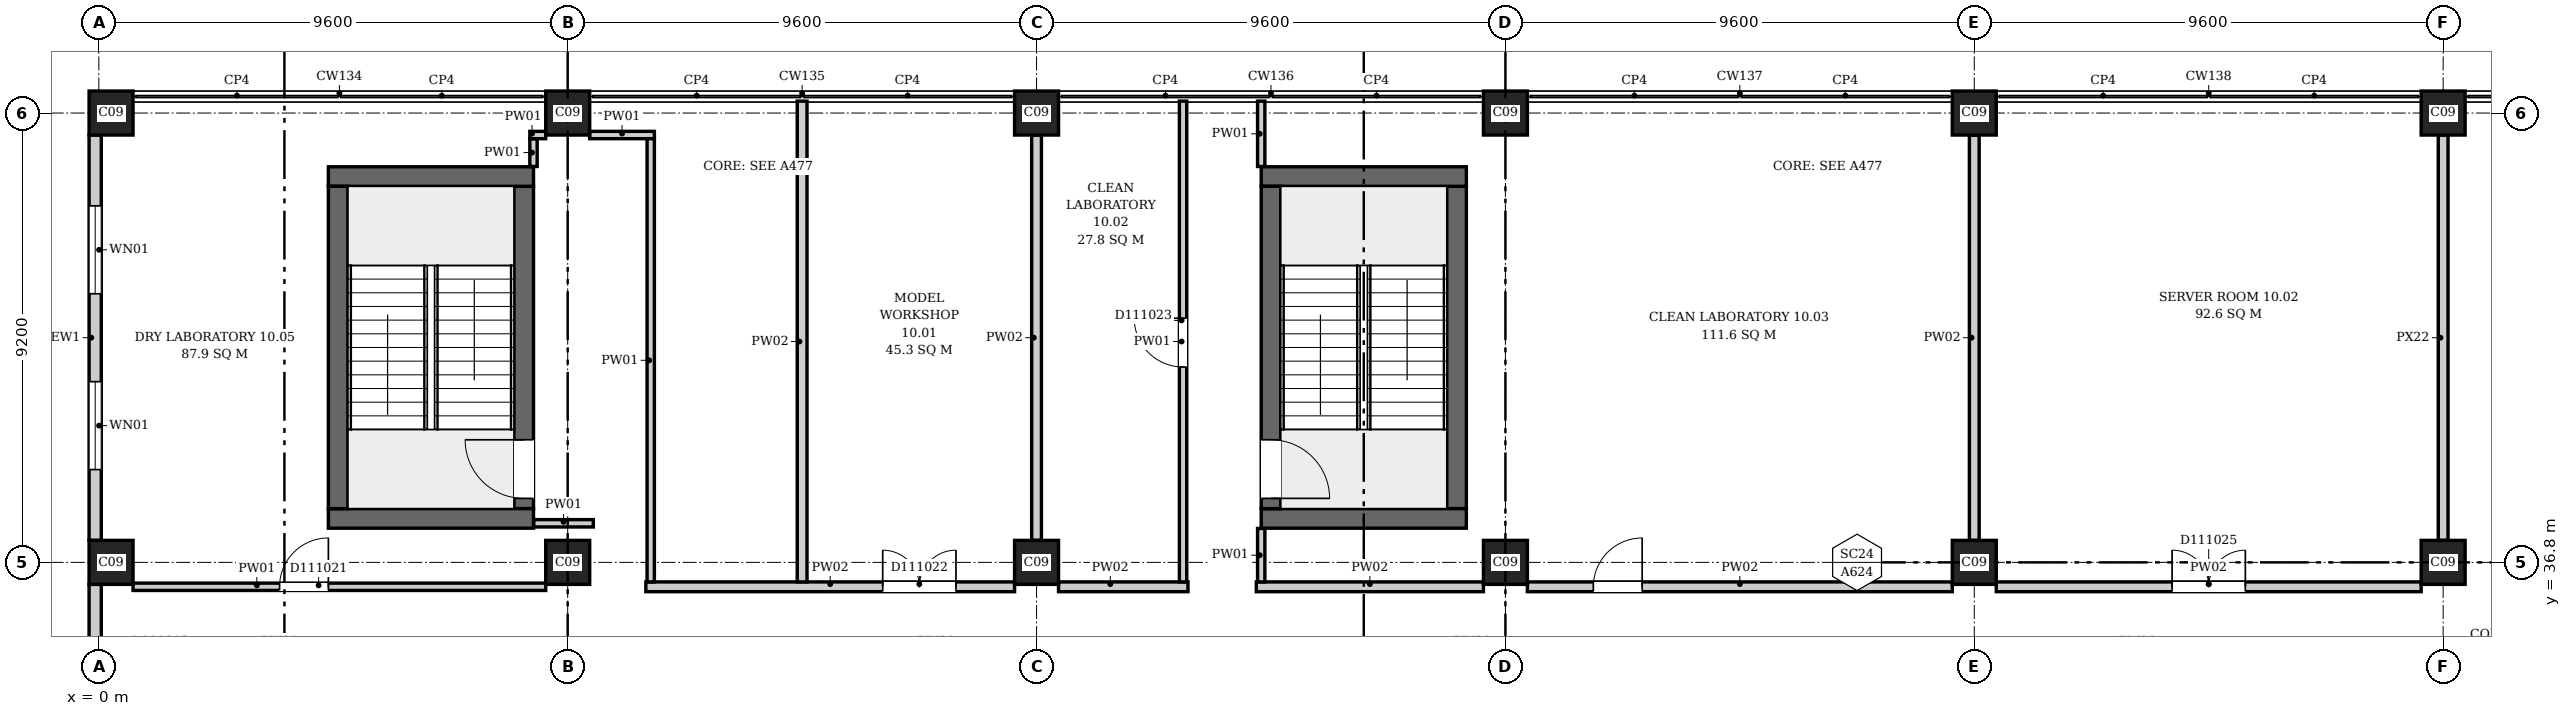
"""IFC4 building model, lengths in metres.
Left out: names, types, materials, properties, quantities, classifications, styles, units other than length and angle.
Written with IfcOpenShell. Run it as: python <this file> out.ifc"""

import sys

from ifc_helpers import new_model, si_unit, direction, frame, frame_2d, origin, origin_2d, place, context, subcontext, project, spatial, rectangle, extrude, element, fill, save


model = new_model("IFC4")
c1 = context("Model", 3, precision=1e-05, world=origin(), true_north=direction((0.0, 1.0)))
c2 = subcontext(c1, "Body", "Model", "MODEL_VIEW")
j1 = project(units=[si_unit("LENGTHUNIT", "METRE"), si_unit("PLANEANGLEUNIT", "RADIAN")], contexts=[c1])
p1 = place(None, origin())
s1 = spatial("IfcSite", under=j1, at=p1, CompositionType="ELEMENT")
p2 = place(p1, origin())
s2 = spatial("IfcBuilding", under=s1, at=p2, CompositionType="ELEMENT")
p3 = place(p2, frame((0.0, 0.0, 52.9)))
s3 = spatial("IfcBuildingStorey", under=s2, at=p3, CompositionType="ELEMENT", Elevation=52.9)
for number, where, z_axis, x_axis in (
    (1, (4.7, 37.7, 0.0), (0.0, 0.0, 1.0), (1.0, 0.0, 0.0)),
    (2, (4.7, 44.7, 0.0), (0.0, 0.0, 1.0), (1.0, 0.0, 0.0)),
):
    element("IfcWall", number, at=place(p3, frame(where, z_axis=z_axis, x_axis=x_axis)), inside=s3, PredefinedType="SHEAR", context=c2, shape_type="SweptSolid", body=[
        extrude(rectangle(XDim=4.2, YDim=0.4, at=frame_2d((2.1, 0.0))), origin(), (0.0, 0.0, 1.0), 4.2),
    ])
p4 = place(p3, frame((4.9, 37.9, 0.0), z_axis=(0.0, 0.0, 1.0), x_axis=(0.0, 1.0, 0.0)))
e3 = element("IfcWall", 3, at=p4, inside=s3, PredefinedType="SHEAR", context=c2, shape_type="SweptSolid", body=[
    extrude(rectangle(XDim=6.6, YDim=0.4, at=frame_2d((3.3, 0.0))), origin(), (0.0, 0.0, 1.0), 4.2),
])
p5 = place(p3, frame((8.7, 37.9, 0.0), z_axis=(0.0, 0.0, 1.0), x_axis=(0.0, 1.0, 0.0)))
e4 = element("IfcWall", 4, at=p5, inside=s3, PredefinedType="SHEAR", context=c2, shape_type="SweptSolid", body=[
    extrude(rectangle(XDim=6.6, YDim=0.4, at=frame_2d((3.3, 0.0))), origin(), (0.0, 0.0, 1.0), 4.2),
])
p6 = place(p5, frame((0.21, 0.0, 0.0)))
e5 = element("IfcOpeningElement", 5, at=p6, cuts=e4, PredefinedType="OPENING", context=c2, shape_type="SweptSolid", body=[
    extrude(rectangle(XDim=1.2, YDim=2.1, at=frame_2d((0.6, 1.05))), frame((0.0, 0.21, 0.0), z_axis=(0.0, -1.0, 0.0), x_axis=(1.0, 0.0, 0.0)), (0.0, 0.0, 1.0), 0.42),
])
for number, where, z_axis, x_axis in (
    (6, (23.8, 37.7, 0.0), (0.0, 0.0, 1.0), (1.0, 0.0, 0.0)),
    (7, (23.8, 44.7, 0.0), (0.0, 0.0, 1.0), (1.0, 0.0, 0.0)),
):
    element("IfcWall", number, at=place(p3, frame(where, z_axis=z_axis, x_axis=x_axis)), inside=s3, PredefinedType="SHEAR", context=c2, shape_type="SweptSolid", body=[
        extrude(rectangle(XDim=4.2, YDim=0.4, at=frame_2d((2.1, 0.0))), origin(), (0.0, 0.0, 1.0), 4.2),
    ])
p7 = place(p3, frame((24.0, 37.9, 0.0), z_axis=(0.0, 0.0, 1.0), x_axis=(0.0, 1.0, 0.0)))
e8 = element("IfcWall", 8, at=p7, inside=s3, PredefinedType="SHEAR", context=c2, shape_type="SweptSolid", body=[
    extrude(rectangle(XDim=6.6, YDim=0.4, at=frame_2d((3.3, 0.0))), origin(), (0.0, 0.0, 1.0), 4.2),
])
p8 = place(p7, frame((0.21, 0.0, 0.0)))
e9 = element("IfcOpeningElement", 9, at=p8, cuts=e8, PredefinedType="OPENING", context=c2, shape_type="SweptSolid", body=[
    extrude(rectangle(XDim=1.2, YDim=2.1, at=frame_2d((0.6, 1.05))), frame((0.0, 0.21, 0.0), z_axis=(0.0, -1.0, 0.0), x_axis=(1.0, 0.0, 0.0)), (0.0, 0.0, 1.0), 0.42),
])
p9 = place(p3, frame((27.8, 37.9, 0.0), z_axis=(0.0, 0.0, 1.0), x_axis=(0.0, 1.0, 0.0)))
e10 = element("IfcWall", 10, at=p9, inside=s3, PredefinedType="SHEAR", context=c2, shape_type="SweptSolid", body=[
    extrude(rectangle(XDim=6.6, YDim=0.4, at=frame_2d((3.3, 0.0))), origin(), (0.0, 0.0, 1.0), 4.2),
])
for number, where, z_axis, x_axis in (
    (11, (0.25, 36.8, 0.0), (0.0, 0.0, 1.0), (1.0, 0.0, 0.0)),
    (12, (9.6, 36.8, 0.0), (0.0, 0.0, 1.0), (1.0, 0.0, 0.0)),
    (13, (19.2, 36.8, 0.0), (0.0, 0.0, 1.0), (1.0, 0.0, 0.0)),
    (14, (28.8, 36.8, 0.0), (0.0, 0.0, 1.0), (1.0, 0.0, 0.0)),
    (15, (38.4, 36.8, 0.0), (0.0, 0.0, 1.0), (1.0, 0.0, 0.0)),
    (16, (48.0, 36.8, 0.0), (0.0, 0.0, 1.0), (1.0, 0.0, 0.0)),
    (17, (0.25, 46.0, 0.0), (0.0, 0.0, 1.0), (1.0, 0.0, 0.0)),
    (18, (9.6, 46.0, 0.0), (0.0, 0.0, 1.0), (1.0, 0.0, 0.0)),
    (19, (19.2, 46.0, 0.0), (0.0, 0.0, 1.0), (1.0, 0.0, 0.0)),
    (20, (28.8, 46.0, 0.0), (0.0, 0.0, 1.0), (1.0, 0.0, 0.0)),
    (21, (38.4, 46.0, 0.0), (0.0, 0.0, 1.0), (1.0, 0.0, 0.0)),
    (22, (48.0, 46.0, 0.0), (0.0, 0.0, 1.0), (1.0, 0.0, 0.0)),
):
    element("IfcColumn", number, at=place(p3, frame(where, z_axis=z_axis, x_axis=x_axis)), inside=s3, PredefinedType="COLUMN", context=c2, shape_type="SweptSolid", body=[
        extrude(rectangle(XDim=0.9, YDim=0.9, at=origin_2d()), origin(), (0.0, 0.0, 1.0), 4.2),
    ])
p10 = place(p3, frame((-0.074, 36.35, 0.0), z_axis=(0.0, 0.0, 1.0), x_axis=(0.0, -1.0, 0.0)))
e23 = element("IfcWall", 23, at=p10, inside=s3, PredefinedType="ELEMENTEDWALL", context=c2, shape_type="SweptSolid", body=[
    extrude(rectangle(XDim=8.3, YDim=0.25, at=frame_2d((4.15, 0.0))), origin(), (0.0, 0.0, 1.0), 3.9),
])
p11 = place(p10, frame((5.05, 0.0, 0.9)))
e24 = element("IfcOpeningElement", 24, at=p11, cuts=e23, PredefinedType="OPENING", context=c2, shape_type="SweptSolid", body=[
    extrude(rectangle(XDim=1.8, YDim=2.6, at=frame_2d((0.9, 1.3))), frame((0.0, 0.135, 0.0), z_axis=(0.0, -1.0, 0.0), x_axis=(1.0, 0.0, 0.0)), (0.0, 0.0, 1.0), 0.27),
])
p12 = place(p10, frame((1.7, 0.0, 0.9)))
e25 = element("IfcOpeningElement", 25, at=p12, cuts=e23, PredefinedType="OPENING", context=c2, shape_type="SweptSolid", body=[
    extrude(rectangle(XDim=1.8, YDim=2.6, at=frame_2d((0.9, 1.3))), frame((0.0, 0.135, 0.0), z_axis=(0.0, -1.0, 0.0), x_axis=(1.0, 0.0, 0.0)), (0.0, 0.0, 1.0), 0.27),
])
p13 = place(p3, frame((-0.074, 45.55, 0.0), z_axis=(0.0, 0.0, 1.0), x_axis=(0.0, -1.0, 0.0)))
e26 = element("IfcWall", 26, at=p13, inside=s3, PredefinedType="ELEMENTEDWALL", context=c2, shape_type="SweptSolid", body=[
    extrude(rectangle(XDim=8.3, YDim=0.25, at=frame_2d((4.15, 0.0))), origin(), (0.0, 0.0, 1.0), 3.9),
])
p14 = place(p13, frame((5.05, 0.0, 0.9)))
e27 = element("IfcOpeningElement", 27, at=p14, cuts=e26, PredefinedType="OPENING", context=c2, shape_type="SweptSolid", body=[
    extrude(rectangle(XDim=1.8, YDim=2.6, at=frame_2d((0.9, 1.3))), frame((0.0, 0.135, 0.0), z_axis=(0.0, -1.0, 0.0), x_axis=(1.0, 0.0, 0.0)), (0.0, 0.0, 1.0), 0.27),
])
p15 = place(p13, frame((1.45, 0.0, 0.9)))
e28 = element("IfcOpeningElement", 28, at=p15, cuts=e26, PredefinedType="OPENING", context=c2, shape_type="SweptSolid", body=[
    extrude(rectangle(XDim=1.8, YDim=2.6, at=frame_2d((0.9, 1.3))), frame((0.0, 0.135, 0.0), z_axis=(0.0, -1.0, 0.0), x_axis=(1.0, 0.0, 0.0)), (0.0, 0.0, 1.0), 0.27),
])
p16 = place(p3, frame((0.7, 36.3, 0.0), z_axis=(0.0, 0.0, 1.0), x_axis=(1.0, 0.0, 0.0)))
e29 = element("IfcWall", 29, at=p16, inside=s3, PredefinedType="PARTITIONING", context=c2, shape_type="SweptSolid", body=[
    extrude(rectangle(XDim=8.45, YDim=0.15, at=frame_2d((4.225, 0.0))), origin(), (0.0, 0.0, 1.0), 3.9),
])
p17 = place(p16, frame((3.0, 0.0, 0.0)))
e30 = element("IfcOpeningElement", 30, at=p17, cuts=e29, PredefinedType="OPENING", context=c2, shape_type="SweptSolid", body=[
    extrude(rectangle(XDim=1.0, YDim=2.1, at=frame_2d((0.5, 1.05))), frame((0.0, 0.085, 0.0), z_axis=(0.0, -1.0, 0.0), x_axis=(1.0, 0.0, 0.0)), (0.0, 0.0, 1.0), 0.17),
])
p18 = place(p3, frame((8.9, 44.906, 0.0), z_axis=(0.0, 0.0, 1.0), x_axis=(0.0, 1.0, 0.0)))
e31 = element("IfcWall", 31, at=p18, inside=s3, PredefinedType="PARTITIONING", context=c2, shape_type="SweptSolid", body=[
    extrude(rectangle(XDim=0.569, YDim=0.15, at=frame_2d((0.285, 0.0))), origin(), (0.0, 0.0, 1.0), 3.9),
])
p19 = place(p3, frame((8.825, 45.55, 0.0), z_axis=(0.0, 0.0, 1.0), x_axis=(1.0, 0.0, 0.0)))
e32 = element("IfcWall", 32, at=p19, inside=s3, PredefinedType="PARTITIONING", context=c2, shape_type="SweptSolid", body=[
    extrude(rectangle(XDim=0.325, YDim=0.15, at=frame_2d((0.163, 0.0))), origin(), (0.0, 0.0, 1.0), 3.9),
])
p20 = place(p3, frame((8.906, 37.6, 0.0), z_axis=(0.0, 0.0, 1.0), x_axis=(1.0, 0.0, 0.0)))
e33 = element("IfcWall", 33, at=p20, inside=s3, PredefinedType="PARTITIONING", context=c2, shape_type="SweptSolid", body=[
    extrude(rectangle(XDim=1.219, YDim=0.15, at=frame_2d((0.609, 0.0))), origin(), (0.0, 0.0, 1.0), 3.9),
])
p21 = place(p3, frame((10.05, 45.55, 0.0), z_axis=(0.0, 0.0, 1.0), x_axis=(1.0, 0.0, 0.0)))
e34 = element("IfcWall", 34, at=p21, inside=s3, PredefinedType="PARTITIONING", context=c2, shape_type="SweptSolid", body=[
    extrude(rectangle(XDim=1.325, YDim=0.15, at=frame_2d((0.663, 0.0))), origin(), (0.0, 0.0, 1.0), 3.9),
])
p22 = place(p3, frame((11.2, 36.3, 0.0), z_axis=(0.0, 0.0, 1.0), x_axis=(1.0, 0.0, 0.0)))
e35 = element("IfcWall", 35, at=p22, inside=s3, PredefinedType="PARTITIONING", context=c2, shape_type="SweptSolid", body=[
    extrude(rectangle(XDim=7.55, YDim=0.2, at=frame_2d((3.775, 0.0))), origin(), (0.0, 0.0, 1.0), 3.9),
])
p23 = place(p22, frame((4.85, 0.0, 0.0)))
e36 = element("IfcOpeningElement", 36, at=p23, cuts=e35, PredefinedType="OPENING", context=c2, shape_type="SweptSolid", body=[
    extrude(rectangle(XDim=1.5, YDim=2.1, at=frame_2d((0.75, 1.05))), frame((0.0, 0.11, 0.0), z_axis=(0.0, -1.0, 0.0), x_axis=(1.0, 0.0, 0.0)), (0.0, 0.0, 1.0), 0.22),
])
p24 = place(p3, frame((11.3, 36.4, 0.0), z_axis=(0.0, 0.0, 1.0), x_axis=(0.0, 1.0, 0.0)))
e37 = element("IfcWall", 37, at=p24, inside=s3, PredefinedType="PARTITIONING", context=c2, shape_type="SweptSolid", body=[
    extrude(rectangle(XDim=9.075, YDim=0.15, at=frame_2d((4.538, 0.0))), origin(), (0.0, 0.0, 1.0), 3.9),
])
p25 = place(p3, frame((14.4, 36.4, 0.0), z_axis=(0.0, 0.0, 1.0), x_axis=(0.0, 1.0, 0.0)))
e38 = element("IfcWall", 38, at=p25, inside=s3, PredefinedType="PARTITIONING", context=c2, shape_type="SweptSolid", body=[
    extrude(rectangle(XDim=9.844, YDim=0.2, at=frame_2d((4.922, 0.0))), origin(), (0.0, 0.0, 1.0), 3.9),
])
p26 = place(p3, frame((19.2, 37.25, 0.0), z_axis=(0.0, 0.0, 1.0), x_axis=(0.0, 1.0, 0.0)))
e39 = element("IfcWall", 39, at=p26, inside=s3, PredefinedType="PARTITIONING", context=c2, shape_type="SweptSolid", body=[
    extrude(rectangle(XDim=8.3, YDim=0.2, at=frame_2d((4.15, 0.0))), origin(), (0.0, 0.0, 1.0), 3.9),
])
p27 = place(p3, frame((19.65, 36.3, 0.0), z_axis=(0.0, 0.0, 1.0), x_axis=(1.0, 0.0, 0.0)))
e40 = element("IfcWall", 40, at=p27, inside=s3, PredefinedType="PARTITIONING", context=c2, shape_type="SweptSolid", body=[
    extrude(rectangle(XDim=2.65, YDim=0.2, at=frame_2d((1.325, 0.0))), origin(), (0.0, 0.0, 1.0), 3.9),
])
p28 = place(p3, frame((22.2, 36.4, 0.0), z_axis=(0.0, 0.0, 1.0), x_axis=(0.0, 1.0, 0.0)))
e41 = element("IfcWall", 41, at=p28, inside=s3, PredefinedType="PARTITIONING", context=c2, shape_type="SweptSolid", body=[
    extrude(rectangle(XDim=9.844, YDim=0.15, at=frame_2d((4.922, 0.0))), origin(), (0.0, 0.0, 1.0), 3.9),
])
p29 = place(p28, frame((4.4, 0.0, 0.0)))
e42 = element("IfcOpeningElement", 42, at=p29, cuts=e41, PredefinedType="OPENING", context=c2, shape_type="SweptSolid", body=[
    extrude(rectangle(XDim=1.0, YDim=2.1, at=frame_2d((0.5, 1.05))), frame((0.0, 0.085, 0.0), z_axis=(0.0, -1.0, 0.0), x_axis=(1.0, 0.0, 0.0)), (0.0, 0.0, 1.0), 0.17),
])
p30 = place(p3, frame((23.7, 36.3, 0.0), z_axis=(0.0, 0.0, 1.0), x_axis=(1.0, 0.0, 0.0)))
e43 = element("IfcWall", 43, at=p30, inside=s3, PredefinedType="PARTITIONING", context=c2, shape_type="SweptSolid", body=[
    extrude(rectangle(XDim=4.65, YDim=0.2, at=frame_2d((2.325, 0.0))), origin(), (0.0, 0.0, 1.0), 3.9),
])
p31 = place(p3, frame((23.8, 36.4, 0.0), z_axis=(0.0, 0.0, 1.0), x_axis=(0.0, 1.0, 0.0)))
e44 = element("IfcWall", 44, at=p31, inside=s3, PredefinedType="PARTITIONING", context=c2, shape_type="SweptSolid", body=[
    extrude(rectangle(XDim=1.094, YDim=0.15, at=frame_2d((0.547, 0.0))), origin(), (0.0, 0.0, 1.0), 3.9),
])
p32 = place(p3, frame((23.8, 44.906, 0.0), z_axis=(0.0, 0.0, 1.0), x_axis=(0.0, 1.0, 0.0)))
e45 = element("IfcWall", 45, at=p32, inside=s3, PredefinedType="PARTITIONING", context=c2, shape_type="SweptSolid", body=[
    extrude(rectangle(XDim=1.338, YDim=0.15, at=frame_2d((0.669, 0.0))), origin(), (0.0, 0.0, 1.0), 3.9),
])
p33 = place(p3, frame((29.25, 36.3, 0.0), z_axis=(0.0, 0.0, 1.0), x_axis=(1.0, 0.0, 0.0)))
e46 = element("IfcWall", 46, at=p33, inside=s3, PredefinedType="PARTITIONING", context=c2, shape_type="SweptSolid", body=[
    extrude(rectangle(XDim=8.7, YDim=0.2, at=frame_2d((4.35, 0.0))), origin(), (0.0, 0.0, 1.0), 3.9),
])
p34 = place(p33, frame((1.35, 0.0, 0.0)))
e47 = element("IfcOpeningElement", 47, at=p34, cuts=e46, PredefinedType="OPENING", context=c2, shape_type="SweptSolid", body=[
    extrude(rectangle(XDim=1.0, YDim=2.1, at=frame_2d((0.5, 1.05))), frame((0.0, 0.11, 0.0), z_axis=(0.0, -1.0, 0.0), x_axis=(1.0, 0.0, 0.0)), (0.0, 0.0, 1.0), 0.22),
])
p35 = place(p3, frame((38.4, 37.25, 0.0), z_axis=(0.0, 0.0, 1.0), x_axis=(0.0, 1.0, 0.0)))
e48 = element("IfcWall", 48, at=p35, inside=s3, PredefinedType="PARTITIONING", context=c2, shape_type="SweptSolid", body=[
    extrude(rectangle(XDim=8.3, YDim=0.2, at=frame_2d((4.15, 0.0))), origin(), (0.0, 0.0, 1.0), 3.9),
])
p36 = place(p3, frame((38.85, 36.3, 0.0), z_axis=(0.0, 0.0, 1.0), x_axis=(1.0, 0.0, 0.0)))
e49 = element("IfcWall", 49, at=p36, inside=s3, PredefinedType="PARTITIONING", context=c2, shape_type="SweptSolid", body=[
    extrude(rectangle(XDim=8.7, YDim=0.2, at=frame_2d((4.35, 0.0))), origin(), (0.0, 0.0, 1.0), 3.9),
])
p37 = place(p36, frame((3.6, 0.0, 0.0)))
e50 = element("IfcOpeningElement", 50, at=p37, cuts=e49, PredefinedType="OPENING", context=c2, shape_type="SweptSolid", body=[
    extrude(rectangle(XDim=1.5, YDim=2.1, at=frame_2d((0.75, 1.05))), frame((0.0, 0.11, 0.0), z_axis=(0.0, -1.0, 0.0), x_axis=(1.0, 0.0, 0.0)), (0.0, 0.0, 1.0), 0.22),
])
p38 = place(p3, frame((48.0, 37.25, 0.0), z_axis=(0.0, 0.0, 1.0), x_axis=(0.0, 1.0, 0.0)))
e51 = element("IfcWall", 51, at=p38, inside=s3, PredefinedType="PARTITIONING", context=c2, shape_type="SweptSolid", body=[
    extrude(rectangle(XDim=8.3, YDim=0.2, at=frame_2d((4.15, 0.0))), origin(), (0.0, 0.0, 1.0), 3.3),
])
p39 = place(p14, origin())
e52 = element("IfcWindow", 52, at=p39, inside=s3, PartitioningType="SINGLE_PANEL", PredefinedType="WINDOW", context=c2, shape_type="SweptSolid", body=[
    extrude(rectangle(XDim=1.8, YDim=2.6, at=frame_2d((0.9, 1.3))), frame((0.0, 0.03, 0.0), z_axis=(0.0, -1.0, 0.0), x_axis=(1.0, 0.0, 0.0)), (0.0, 0.0, 1.0), 0.06),
])
fill(e27, e52)
p40 = place(p15, origin())
e53 = element("IfcWindow", 53, at=p40, inside=s3, PartitioningType="SINGLE_PANEL", PredefinedType="WINDOW", context=c2, shape_type="SweptSolid", body=[
    extrude(rectangle(XDim=1.8, YDim=2.6, at=frame_2d((0.9, 1.3))), frame((0.0, 0.03, 0.0), z_axis=(0.0, -1.0, 0.0), x_axis=(1.0, 0.0, 0.0)), (0.0, 0.0, 1.0), 0.06),
])
fill(e28, e53)
p41 = place(p6, origin())
e54 = element("IfcDoor", 54, at=p41, inside=s3, OperationType="SINGLE_SWING_RIGHT", PredefinedType="DOOR", context=c2, shape_type="SweptSolid", body=[
    extrude(rectangle(XDim=1.2, YDim=2.1, at=frame_2d((0.6, 1.05))), frame((0.0, 0.025, 0.0), z_axis=(0.0, -1.0, 0.0), x_axis=(1.0, 0.0, 0.0)), (0.0, 0.0, 1.0), 0.05),
])
fill(e5, e54)
p42 = place(p8, origin())
e55 = element("IfcDoor", 55, at=p42, inside=s3, OperationType="SINGLE_SWING_LEFT", PredefinedType="DOOR", context=c2, shape_type="SweptSolid", body=[
    extrude(rectangle(XDim=1.2, YDim=2.1, at=frame_2d((0.6, 1.05))), frame((0.0, 0.025, 0.0), z_axis=(0.0, -1.0, 0.0), x_axis=(1.0, 0.0, 0.0)), (0.0, 0.0, 1.0), 0.05),
])
fill(e9, e55)
p43 = place(p17, origin())
e56 = element("IfcDoor", 56, at=p43, inside=s3, OperationType="SINGLE_SWING_RIGHT", PredefinedType="DOOR", context=c2, shape_type="SweptSolid", body=[
    extrude(rectangle(XDim=1.0, YDim=2.1, at=frame_2d((0.5, 1.05))), frame((0.0, 0.025, 0.0), z_axis=(0.0, -1.0, 0.0), x_axis=(1.0, 0.0, 0.0)), (0.0, 0.0, 1.0), 0.05),
])
fill(e30, e56)
p44 = place(p23, origin())
e57 = element("IfcDoor", 57, at=p44, inside=s3, OperationType="DOUBLE_DOOR_SINGLE_SWING", PredefinedType="DOOR", context=c2, shape_type="SweptSolid", body=[
    extrude(rectangle(XDim=1.5, YDim=2.1, at=frame_2d((0.75, 1.05))), frame((0.0, 0.025, 0.0), z_axis=(0.0, -1.0, 0.0), x_axis=(1.0, 0.0, 0.0)), (0.0, 0.0, 1.0), 0.05),
])
fill(e36, e57)
p45 = place(p29, origin())
e58 = element("IfcDoor", 58, at=p45, inside=s3, OperationType="SINGLE_SWING_RIGHT", PredefinedType="DOOR", context=c2, shape_type="SweptSolid", body=[
    extrude(rectangle(XDim=1.0, YDim=2.1, at=frame_2d((0.5, 1.05))), frame((0.0, 0.025, 0.0), z_axis=(0.0, -1.0, 0.0), x_axis=(1.0, 0.0, 0.0)), (0.0, 0.0, 1.0), 0.05),
])
fill(e42, e58)
p46 = place(p34, origin())
e59 = element("IfcDoor", 59, at=p46, inside=s3, OperationType="SINGLE_SWING_LEFT", PredefinedType="DOOR", context=c2, shape_type="SweptSolid", body=[
    extrude(rectangle(XDim=1.0, YDim=2.1, at=frame_2d((0.5, 1.05))), frame((0.0, 0.025, 0.0), z_axis=(0.0, -1.0, 0.0), x_axis=(1.0, 0.0, 0.0)), (0.0, 0.0, 1.0), 0.05),
])
fill(e47, e59)
p47 = place(p37, origin())
e60 = element("IfcDoor", 60, at=p47, inside=s3, OperationType="DOUBLE_DOOR_SINGLE_SWING", PredefinedType="DOOR", context=c2, shape_type="SweptSolid", body=[
    extrude(rectangle(XDim=1.5, YDim=2.1, at=frame_2d((0.75, 1.05))), frame((0.0, 0.025, 0.0), z_axis=(0.0, -1.0, 0.0), x_axis=(1.0, 0.0, 0.0)), (0.0, 0.0, 1.0), 0.05),
])
fill(e50, e60)
save(model, sys.argv[1])
